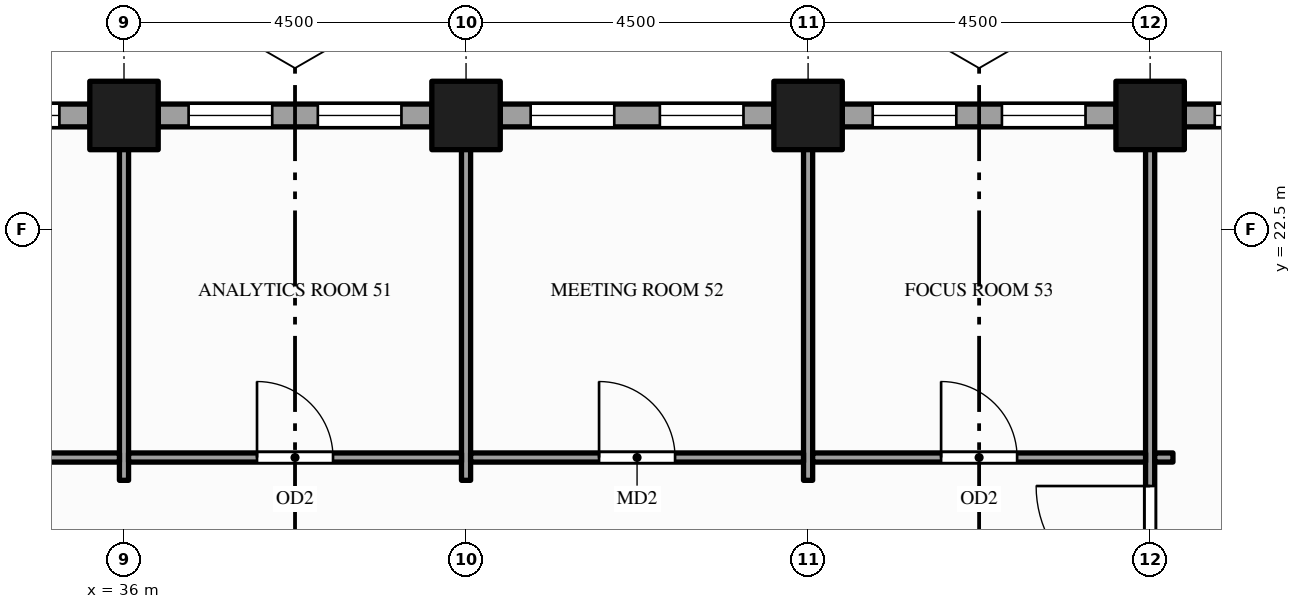
"""IFC4 building model, lengths in metres.
Left out: names, types, materials, properties, quantities, classifications, styles, units other than length and angle.
Written with IfcOpenShell. Run it as: python <this file> out.ifc"""

import sys

from ifc_helpers import new_model, si_unit, direction, frame, frame_2d, origin, origin_2d, place, context, subcontext, project, spatial, rectangle, hollow_rectangle, extrude, element, fill, save


model = new_model("IFC4")
c1 = context("Model", 3, precision=1e-05, world=origin(), true_north=direction((0.0, 1.0)))
c2 = subcontext(c1, "Body", "Model", "MODEL_VIEW")
j1 = project(units=[si_unit("LENGTHUNIT", "METRE"), si_unit("PLANEANGLEUNIT", "RADIAN")], contexts=[c1])
p1 = place(None, origin())
s1 = spatial("IfcSite", under=j1, at=p1, CompositionType="ELEMENT")
p2 = place(p1, origin())
s2 = spatial("IfcBuilding", under=s1, at=p2, CompositionType="ELEMENT")
p3 = place(p2, frame((0.0, 0.0, 183.0)))
s3 = spatial("IfcBuildingStorey", under=s2, at=p3, CompositionType="ELEMENT", Elevation=183.0)
for number, where, z_axis, x_axis in (
    (1, (36.0, 24.0, -0.15), (0.0, 0.0, 1.0), (1.0, 0.0, 0.0)),
    (2, (40.5, 24.0, -0.15), (0.0, 0.0, 1.0), (1.0, 0.0, 0.0)),
    (3, (45.0, 24.0, -0.15), (0.0, 0.0, 1.0), (1.0, 0.0, 0.0)),
    (4, (49.5, 24.0, -0.15), (0.0, 0.0, 1.0), (1.0, 0.0, 0.0)),
):
    element("IfcColumn", number, at=place(p3, frame(where, z_axis=z_axis, x_axis=x_axis)), inside=s3, PredefinedType="COLUMN", context=c2, shape_type="SweptSolid", body=[
        extrude(hollow_rectangle(XDim=0.9, YDim=0.9, WallThickness=0.045, at=origin_2d()), origin(), (0.0, 0.0, 1.0), 3.9),
    ])
p4 = place(p3, frame((53.55, 24.0, 0.0), z_axis=(0.0, 0.0, 1.0), x_axis=(-1.0, 0.0, 0.0)))
e5 = element("IfcWall", 5, at=p4, inside=s3, PredefinedType="STANDARD", context=c2, shape_type="SweptSolid", body=[
    extrude(rectangle(XDim=3.6, YDim=0.3, at=frame_2d((1.8, 0.0))), origin(), (0.0, 0.0, 1.0), 3.049),
])
p5 = place(p4, frame((0.4, 0.0, 0.9)))
e6 = element("IfcOpeningElement", 6, at=p5, cuts=e5, PredefinedType="OPENING", context=c2, shape_type="SweptSolid", body=[
    extrude(rectangle(XDim=1.1, YDim=2.0, at=frame_2d((0.55, 1.0))), frame((0.0, 0.16, 0.0), z_axis=(0.0, -1.0, 0.0), x_axis=(1.0, 0.0, 0.0)), (0.0, 0.0, 1.0), 0.32),
])
p6 = place(p4, frame((2.1, 0.0, 0.9)))
e7 = element("IfcOpeningElement", 7, at=p6, cuts=e5, PredefinedType="OPENING", context=c2, shape_type="SweptSolid", body=[
    extrude(rectangle(XDim=1.1, YDim=2.0, at=frame_2d((0.55, 1.0))), frame((0.0, 0.16, 0.0), z_axis=(0.0, -1.0, 0.0), x_axis=(1.0, 0.0, 0.0)), (0.0, 0.0, 1.0), 0.32),
])
p7 = place(p3, frame((49.05, 24.0, 0.0), z_axis=(0.0, 0.0, 1.0), x_axis=(-1.0, 0.0, 0.0)))
e8 = element("IfcWall", 8, at=p7, inside=s3, PredefinedType="STANDARD", context=c2, shape_type="SweptSolid", body=[
    extrude(rectangle(XDim=3.6, YDim=0.3, at=frame_2d((1.8, 0.0))), origin(), (0.0, 0.0, 1.0), 3.049),
])
p8 = place(p7, frame((0.4, 0.0, 0.9)))
e9 = element("IfcOpeningElement", 9, at=p8, cuts=e8, PredefinedType="OPENING", context=c2, shape_type="SweptSolid", body=[
    extrude(rectangle(XDim=1.1, YDim=2.0, at=frame_2d((0.55, 1.0))), frame((0.0, 0.16, 0.0), z_axis=(0.0, -1.0, 0.0), x_axis=(1.0, 0.0, 0.0)), (0.0, 0.0, 1.0), 0.32),
])
p9 = place(p7, frame((2.1, 0.0, 0.9)))
e10 = element("IfcOpeningElement", 10, at=p9, cuts=e8, PredefinedType="OPENING", context=c2, shape_type="SweptSolid", body=[
    extrude(rectangle(XDim=1.1, YDim=2.0, at=frame_2d((0.55, 1.0))), frame((0.0, 0.16, 0.0), z_axis=(0.0, -1.0, 0.0), x_axis=(1.0, 0.0, 0.0)), (0.0, 0.0, 1.0), 0.32),
])
p10 = place(p3, frame((44.55, 24.0, 0.0), z_axis=(0.0, 0.0, 1.0), x_axis=(-1.0, 0.0, 0.0)))
e11 = element("IfcWall", 11, at=p10, inside=s3, PredefinedType="STANDARD", context=c2, shape_type="SweptSolid", body=[
    extrude(rectangle(XDim=3.6, YDim=0.3, at=frame_2d((1.8, 0.0))), origin(), (0.0, 0.0, 1.0), 3.049),
])
p11 = place(p10, frame((0.4, 0.0, 0.9)))
e12 = element("IfcOpeningElement", 12, at=p11, cuts=e11, PredefinedType="OPENING", context=c2, shape_type="SweptSolid", body=[
    extrude(rectangle(XDim=1.1, YDim=2.0, at=frame_2d((0.55, 1.0))), frame((0.0, 0.16, 0.0), z_axis=(0.0, -1.0, 0.0), x_axis=(1.0, 0.0, 0.0)), (0.0, 0.0, 1.0), 0.32),
])
p12 = place(p10, frame((2.1, 0.0, 0.9)))
e13 = element("IfcOpeningElement", 13, at=p12, cuts=e11, PredefinedType="OPENING", context=c2, shape_type="SweptSolid", body=[
    extrude(rectangle(XDim=1.1, YDim=2.0, at=frame_2d((0.55, 1.0))), frame((0.0, 0.16, 0.0), z_axis=(0.0, -1.0, 0.0), x_axis=(1.0, 0.0, 0.0)), (0.0, 0.0, 1.0), 0.32),
])
p13 = place(p3, frame((40.05, 24.0, 0.0), z_axis=(0.0, 0.0, 1.0), x_axis=(-1.0, 0.0, 0.0)))
e14 = element("IfcWall", 14, at=p13, inside=s3, PredefinedType="STANDARD", context=c2, shape_type="SweptSolid", body=[
    extrude(rectangle(XDim=3.6, YDim=0.3, at=frame_2d((1.8, 0.0))), origin(), (0.0, 0.0, 1.0), 3.049),
])
p14 = place(p13, frame((0.4, 0.0, 0.9)))
e15 = element("IfcOpeningElement", 15, at=p14, cuts=e14, PredefinedType="OPENING", context=c2, shape_type="SweptSolid", body=[
    extrude(rectangle(XDim=1.1, YDim=2.0, at=frame_2d((0.55, 1.0))), frame((0.0, 0.16, 0.0), z_axis=(0.0, -1.0, 0.0), x_axis=(1.0, 0.0, 0.0)), (0.0, 0.0, 1.0), 0.32),
])
p15 = place(p13, frame((2.1, 0.0, 0.9)))
e16 = element("IfcOpeningElement", 16, at=p15, cuts=e14, PredefinedType="OPENING", context=c2, shape_type="SweptSolid", body=[
    extrude(rectangle(XDim=1.1, YDim=2.0, at=frame_2d((0.55, 1.0))), frame((0.0, 0.16, 0.0), z_axis=(0.0, -1.0, 0.0), x_axis=(1.0, 0.0, 0.0)), (0.0, 0.0, 1.0), 0.32),
])
p16 = place(p3, frame((35.55, 24.0, 0.0), z_axis=(0.0, 0.0, 1.0), x_axis=(-1.0, 0.0, 0.0)))
e17 = element("IfcWall", 17, at=p16, inside=s3, PredefinedType="STANDARD", context=c2, shape_type="SweptSolid", body=[
    extrude(rectangle(XDim=3.6, YDim=0.3, at=frame_2d((1.8, 0.0))), origin(), (0.0, 0.0, 1.0), 3.049),
])
p17 = place(p16, frame((0.4, 0.0, 0.9)))
e18 = element("IfcOpeningElement", 18, at=p17, cuts=e17, PredefinedType="OPENING", context=c2, shape_type="SweptSolid", body=[
    extrude(rectangle(XDim=1.1, YDim=2.0, at=frame_2d((0.55, 1.0))), frame((0.0, 0.16, 0.0), z_axis=(0.0, -1.0, 0.0), x_axis=(1.0, 0.0, 0.0)), (0.0, 0.0, 1.0), 0.32),
])
p18 = place(p16, frame((2.1, 0.0, 0.9)))
e19 = element("IfcOpeningElement", 19, at=p18, cuts=e17, PredefinedType="OPENING", context=c2, shape_type="SweptSolid", body=[
    extrude(rectangle(XDim=1.1, YDim=2.0, at=frame_2d((0.55, 1.0))), frame((0.0, 0.16, 0.0), z_axis=(0.0, -1.0, 0.0), x_axis=(1.0, 0.0, 0.0)), (0.0, 0.0, 1.0), 0.32),
])
for number, where, z_axis, x_axis in (
    (20, (36.0, 19.2, 0.0), (0.0, 0.0, 1.0), (0.0, 1.0, 0.0)),
    (21, (40.5, 19.2, 0.0), (0.0, 0.0, 1.0), (0.0, 1.0, 0.0)),
    (22, (45.0, 19.2, 0.0), (0.0, 0.0, 1.0), (0.0, 1.0, 0.0)),
):
    element("IfcWall", number, at=place(p3, frame(where, z_axis=z_axis, x_axis=x_axis)), inside=s3, PredefinedType="PARTITIONING", context=c2, shape_type="SweptSolid", body=[
        extrude(rectangle(XDim=4.65, YDim=0.12, at=frame_2d((2.325, 0.0))), origin(), (0.0, 0.0, 1.0), 2.35),
    ])
p19 = place(p3, frame((49.5, 1.65, 0.0), z_axis=(0.0, 0.0, 1.0), x_axis=(0.0, 1.0, 0.0)))
e23 = element("IfcWall", 23, at=p19, inside=s3, PredefinedType="PARTITIONING", context=c2, shape_type="SweptSolid", body=[
    extrude(rectangle(XDim=22.2, YDim=0.12, at=frame_2d((11.1, 0.0))), origin(), (0.0, 0.0, 1.0), 2.35),
])
p20 = place(p19, frame((4.725, 0.0, 0.0)))
e24 = element("IfcOpeningElement", 24, at=p20, cuts=e23, PredefinedType="OPENING", context=c2, shape_type="SweptSolid", body=[
    extrude(rectangle(XDim=1.5, YDim=2.1, at=frame_2d((0.75, 1.05))), frame((0.0, 0.07, 0.0), z_axis=(0.0, -1.0, 0.0), x_axis=(1.0, 0.0, 0.0)), (0.0, 0.0, 1.0), 0.14),
])
p21 = place(p19, frame((15.975, 0.0, 0.0)))
e25 = element("IfcOpeningElement", 25, at=p21, cuts=e23, PredefinedType="OPENING", context=c2, shape_type="SweptSolid", body=[
    extrude(rectangle(XDim=1.5, YDim=2.1, at=frame_2d((0.75, 1.05))), frame((0.0, 0.07, 0.0), z_axis=(0.0, -1.0, 0.0), x_axis=(1.0, 0.0, 0.0)), (0.0, 0.0, 1.0), 0.14),
])
p22 = place(p19, frame((7.6, 0.0, 0.0)))
e26 = element("IfcOpeningElement", 26, at=p22, cuts=e23, PredefinedType="OPENING", context=c2, shape_type="SweptSolid", body=[
    extrude(rectangle(XDim=0.9, YDim=2.1, at=frame_2d((0.45, 1.05))), frame((0.0, 0.07, 0.0), z_axis=(0.0, -1.0, 0.0), x_axis=(1.0, 0.0, 0.0)), (0.0, 0.0, 1.0), 0.14),
])
p23 = place(p19, frame((10.65, 0.0, 0.0)))
e27 = element("IfcOpeningElement", 27, at=p23, cuts=e23, PredefinedType="OPENING", context=c2, shape_type="SweptSolid", body=[
    extrude(rectangle(XDim=0.9, YDim=2.1, at=frame_2d((0.45, 1.05))), frame((0.0, 0.07, 0.0), z_axis=(0.0, -1.0, 0.0), x_axis=(1.0, 0.0, 0.0)), (0.0, 0.0, 1.0), 0.14),
])
p24 = place(p19, frame((13.6, 0.0, 0.0)))
e28 = element("IfcOpeningElement", 28, at=p24, cuts=e23, PredefinedType="OPENING", context=c2, shape_type="SweptSolid", body=[
    extrude(rectangle(XDim=1.0, YDim=2.1, at=frame_2d((0.5, 1.05))), frame((0.0, 0.07, 0.0), z_axis=(0.0, -1.0, 0.0), x_axis=(1.0, 0.0, 0.0)), (0.0, 0.0, 1.0), 0.14),
])
p25 = place(p3, frame((31.56, 19.5, 0.0), z_axis=(0.0, 0.0, 1.0), x_axis=(1.0, 0.0, 0.0)))
e29 = element("IfcWall", 29, at=p25, inside=s3, PredefinedType="PARTITIONING", context=c2, shape_type="SweptSolid", body=[
    extrude(rectangle(XDim=4.38, YDim=0.12, at=frame_2d((2.19, 0.0))), origin(), (0.0, 0.0, 1.0), 2.77),
])
p26 = place(p25, frame((1.69, 0.0, 0.0)))
e30 = element("IfcOpeningElement", 30, at=p26, cuts=e29, PredefinedType="OPENING", context=c2, shape_type="SweptSolid", body=[
    extrude(rectangle(XDim=1.0, YDim=2.1, at=frame_2d((0.5, 1.05))), frame((0.0, 0.07, 0.0), z_axis=(0.0, -1.0, 0.0), x_axis=(1.0, 0.0, 0.0)), (0.0, 0.0, 1.0), 0.14),
])
p27 = place(p3, frame((36.06, 19.5, 0.0), z_axis=(0.0, 0.0, 1.0), x_axis=(1.0, 0.0, 0.0)))
e31 = element("IfcWall", 31, at=p27, inside=s3, PredefinedType="PARTITIONING", context=c2, shape_type="SweptSolid", body=[
    extrude(rectangle(XDim=4.38, YDim=0.12, at=frame_2d((2.19, 0.0))), origin(), (0.0, 0.0, 1.0), 2.77),
])
p28 = place(p27, frame((1.69, 0.0, 0.0)))
e32 = element("IfcOpeningElement", 32, at=p28, cuts=e31, PredefinedType="OPENING", context=c2, shape_type="SweptSolid", body=[
    extrude(rectangle(XDim=1.0, YDim=2.1, at=frame_2d((0.5, 1.05))), frame((0.0, 0.07, 0.0), z_axis=(0.0, -1.0, 0.0), x_axis=(1.0, 0.0, 0.0)), (0.0, 0.0, 1.0), 0.14),
])
p29 = place(p3, frame((40.56, 19.5, 0.0), z_axis=(0.0, 0.0, 1.0), x_axis=(1.0, 0.0, 0.0)))
e33 = element("IfcWall", 33, at=p29, inside=s3, PredefinedType="PARTITIONING", context=c2, shape_type="SweptSolid", body=[
    extrude(rectangle(XDim=4.38, YDim=0.12, at=frame_2d((2.19, 0.0))), origin(), (0.0, 0.0, 1.0), 2.77),
])
p30 = place(p29, frame((1.69, 0.0, 0.0)))
e34 = element("IfcOpeningElement", 34, at=p30, cuts=e33, PredefinedType="OPENING", context=c2, shape_type="SweptSolid", body=[
    extrude(rectangle(XDim=1.0, YDim=2.1, at=frame_2d((0.5, 1.05))), frame((0.0, 0.07, 0.0), z_axis=(0.0, -1.0, 0.0), x_axis=(1.0, 0.0, 0.0)), (0.0, 0.0, 1.0), 0.14),
])
p31 = place(p3, frame((45.06, 19.5, 0.0), z_axis=(0.0, 0.0, 1.0), x_axis=(1.0, 0.0, 0.0)))
e35 = element("IfcWall", 35, at=p31, inside=s3, PredefinedType="PARTITIONING", context=c2, shape_type="SweptSolid", body=[
    extrude(rectangle(XDim=4.38, YDim=0.12, at=frame_2d((2.19, 0.0))), origin(), (0.0, 0.0, 1.0), 2.77),
])
p32 = place(p31, frame((1.69, 0.0, 0.0)))
e36 = element("IfcOpeningElement", 36, at=p32, cuts=e35, PredefinedType="OPENING", context=c2, shape_type="SweptSolid", body=[
    extrude(rectangle(XDim=1.0, YDim=2.1, at=frame_2d((0.5, 1.05))), frame((0.0, 0.07, 0.0), z_axis=(0.0, -1.0, 0.0), x_axis=(1.0, 0.0, 0.0)), (0.0, 0.0, 1.0), 0.14),
])
p33 = place(p3, frame((49.56, 19.5, 0.0), z_axis=(0.0, 0.0, 1.0), x_axis=(1.0, 0.0, 0.0)))
e37 = element("IfcWall", 37, at=p33, inside=s3, PredefinedType="PARTITIONING", context=c2, shape_type="SweptSolid", body=[
    extrude(rectangle(XDim=0.24, YDim=0.12, at=frame_2d((0.12, 0.0))), origin(), (0.0, 0.0, 1.0), 2.77),
])
p34 = place(p6, origin())
e38 = element("IfcWindow", 38, at=p34, inside=s3, PartitioningType="SINGLE_PANEL", PredefinedType="WINDOW", context=c2, shape_type="SweptSolid", body=[
    extrude(rectangle(XDim=1.1, YDim=2.0, at=frame_2d((0.55, 1.0))), frame((0.0, 0.03, 0.0), z_axis=(0.0, -1.0, 0.0), x_axis=(1.0, 0.0, 0.0)), (0.0, 0.0, 1.0), 0.06),
])
fill(e7, e38)
p35 = place(p8, origin())
e39 = element("IfcWindow", 39, at=p35, inside=s3, PartitioningType="SINGLE_PANEL", PredefinedType="WINDOW", context=c2, shape_type="SweptSolid", body=[
    extrude(rectangle(XDim=1.1, YDim=2.0, at=frame_2d((0.55, 1.0))), frame((0.0, 0.03, 0.0), z_axis=(0.0, -1.0, 0.0), x_axis=(1.0, 0.0, 0.0)), (0.0, 0.0, 1.0), 0.06),
])
fill(e9, e39)
p36 = place(p9, origin())
e40 = element("IfcWindow", 40, at=p36, inside=s3, PartitioningType="SINGLE_PANEL", PredefinedType="WINDOW", context=c2, shape_type="SweptSolid", body=[
    extrude(rectangle(XDim=1.1, YDim=2.0, at=frame_2d((0.55, 1.0))), frame((0.0, 0.03, 0.0), z_axis=(0.0, -1.0, 0.0), x_axis=(1.0, 0.0, 0.0)), (0.0, 0.0, 1.0), 0.06),
])
fill(e10, e40)
p37 = place(p11, origin())
e41 = element("IfcWindow", 41, at=p37, inside=s3, PartitioningType="SINGLE_PANEL", PredefinedType="WINDOW", context=c2, shape_type="SweptSolid", body=[
    extrude(rectangle(XDim=1.1, YDim=2.0, at=frame_2d((0.55, 1.0))), frame((0.0, 0.03, 0.0), z_axis=(0.0, -1.0, 0.0), x_axis=(1.0, 0.0, 0.0)), (0.0, 0.0, 1.0), 0.06),
])
fill(e12, e41)
p38 = place(p12, origin())
e42 = element("IfcWindow", 42, at=p38, inside=s3, PartitioningType="SINGLE_PANEL", PredefinedType="WINDOW", context=c2, shape_type="SweptSolid", body=[
    extrude(rectangle(XDim=1.1, YDim=2.0, at=frame_2d((0.55, 1.0))), frame((0.0, 0.03, 0.0), z_axis=(0.0, -1.0, 0.0), x_axis=(1.0, 0.0, 0.0)), (0.0, 0.0, 1.0), 0.06),
])
fill(e13, e42)
p39 = place(p14, origin())
e43 = element("IfcWindow", 43, at=p39, inside=s3, PartitioningType="SINGLE_PANEL", PredefinedType="WINDOW", context=c2, shape_type="SweptSolid", body=[
    extrude(rectangle(XDim=1.1, YDim=2.0, at=frame_2d((0.55, 1.0))), frame((0.0, 0.03, 0.0), z_axis=(0.0, -1.0, 0.0), x_axis=(1.0, 0.0, 0.0)), (0.0, 0.0, 1.0), 0.06),
])
fill(e15, e43)
p40 = place(p15, origin())
e44 = element("IfcWindow", 44, at=p40, inside=s3, PartitioningType="SINGLE_PANEL", PredefinedType="WINDOW", context=c2, shape_type="SweptSolid", body=[
    extrude(rectangle(XDim=1.1, YDim=2.0, at=frame_2d((0.55, 1.0))), frame((0.0, 0.03, 0.0), z_axis=(0.0, -1.0, 0.0), x_axis=(1.0, 0.0, 0.0)), (0.0, 0.0, 1.0), 0.06),
])
fill(e16, e44)
p41 = place(p17, origin())
e45 = element("IfcWindow", 45, at=p41, inside=s3, PartitioningType="SINGLE_PANEL", PredefinedType="WINDOW", context=c2, shape_type="SweptSolid", body=[
    extrude(rectangle(XDim=1.1, YDim=2.0, at=frame_2d((0.55, 1.0))), frame((0.0, 0.03, 0.0), z_axis=(0.0, -1.0, 0.0), x_axis=(1.0, 0.0, 0.0)), (0.0, 0.0, 1.0), 0.06),
])
fill(e18, e45)
p42 = place(p21, origin())
e46 = element("IfcDoor", 46, at=p42, inside=s3, OperationType="SINGLE_SWING_RIGHT", PredefinedType="DOOR", context=c2, shape_type="SweptSolid", body=[
    extrude(rectangle(XDim=1.5, YDim=2.1, at=frame_2d((0.75, 1.05))), frame((0.0, 0.025, 0.0), z_axis=(0.0, -1.0, 0.0), x_axis=(1.0, 0.0, 0.0)), (0.0, 0.0, 1.0), 0.05),
])
fill(e25, e46)
p43 = place(p28, origin())
e47 = element("IfcDoor", 47, at=p43, inside=s3, OperationType="SINGLE_SWING_LEFT", PredefinedType="DOOR", context=c2, shape_type="SweptSolid", body=[
    extrude(rectangle(XDim=1.0, YDim=2.1, at=frame_2d((0.5, 1.05))), frame((0.0, 0.025, 0.0), z_axis=(0.0, -1.0, 0.0), x_axis=(1.0, 0.0, 0.0)), (0.0, 0.0, 1.0), 0.05),
])
fill(e32, e47)
p44 = place(p30, origin())
e48 = element("IfcDoor", 48, at=p44, inside=s3, OperationType="SINGLE_SWING_LEFT", PredefinedType="DOOR", context=c2, shape_type="SweptSolid", body=[
    extrude(rectangle(XDim=1.0, YDim=2.1, at=frame_2d((0.5, 1.05))), frame((0.0, 0.025, 0.0), z_axis=(0.0, -1.0, 0.0), x_axis=(1.0, 0.0, 0.0)), (0.0, 0.0, 1.0), 0.05),
])
fill(e34, e48)
p45 = place(p32, origin())
e49 = element("IfcDoor", 49, at=p45, inside=s3, OperationType="SINGLE_SWING_LEFT", PredefinedType="DOOR", context=c2, shape_type="SweptSolid", body=[
    extrude(rectangle(XDim=1.0, YDim=2.1, at=frame_2d((0.5, 1.05))), frame((0.0, 0.025, 0.0), z_axis=(0.0, -1.0, 0.0), x_axis=(1.0, 0.0, 0.0)), (0.0, 0.0, 1.0), 0.05),
])
fill(e36, e49)
save(model, sys.argv[1])
